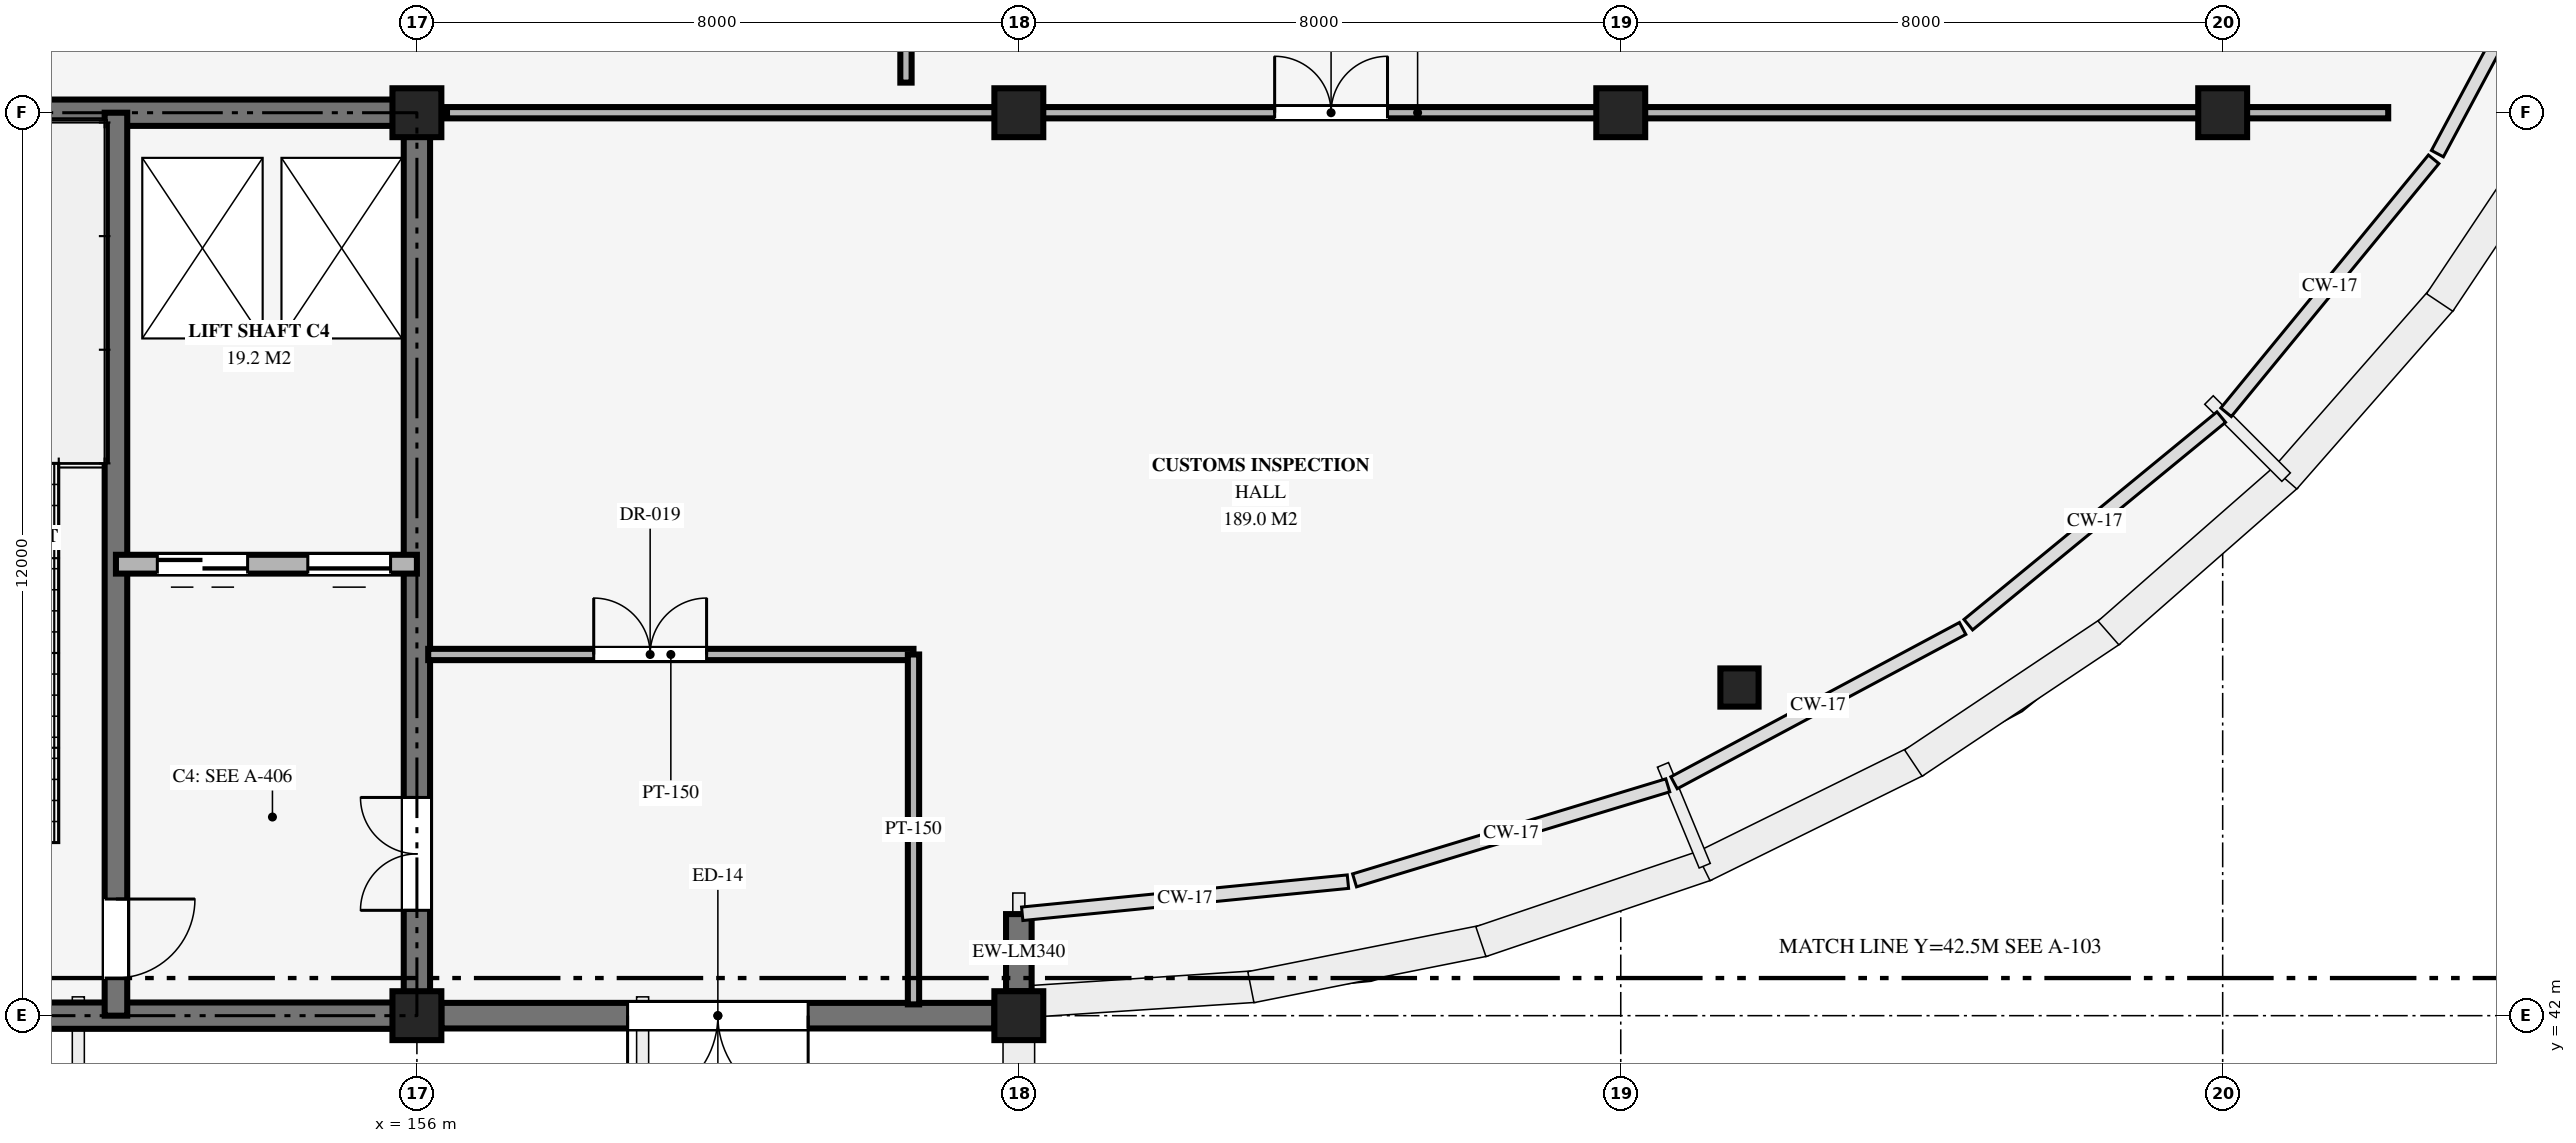
"""IFC4 building model, lengths in metres.
Left out: names, types, materials, properties, quantities, classifications, styles, units other than length and angle.
Written with IfcOpenShell. Run it as: python <this file> out.ifc"""

import sys

from ifc_helpers import new_model, si_unit, direction, frame, frame_2d, origin, origin_2d, place, context, subcontext, project, spatial, rectangle, hollow_circle, extrude, element, fill, save


model = new_model("IFC4")
c1 = context("Model", 3, precision=1e-05, world=origin(), true_north=direction((0.0, 1.0)))
c2 = subcontext(c1, "Body", "Model", "MODEL_VIEW")
j1 = project(units=[si_unit("LENGTHUNIT", "METRE"), si_unit("PLANEANGLEUNIT", "RADIAN")], contexts=[c1])
p1 = place(None, origin())
s1 = spatial("IfcSite", under=j1, at=p1, CompositionType="ELEMENT")
p2 = place(p1, origin())
s2 = spatial("IfcBuilding", under=s1, at=p2, CompositionType="ELEMENT")
p3 = place(p2, origin())
s3 = spatial("IfcBuildingStorey", under=s2, at=p3, CompositionType="ELEMENT", Elevation=0.0)
for number, where, z_axis, x_axis in (
    (1, (156.0, 42.0, 0.0), (0.0, 0.0, 1.0), (1.0, 0.0, 0.0)),
    (2, (156.0, 54.0, 0.0), (0.0, 0.0, 1.0), (1.0, 0.0, 0.0)),
    (3, (164.0, 42.0, 0.0), (0.0, 0.0, 1.0), (1.0, 0.0, 0.0)),
    (4, (164.0, 54.0, 0.0), (0.0, 0.0, 1.0), (1.0, 0.0, 0.0)),
    (5, (172.0, 54.0, 0.0), (0.0, 0.0, 1.0), (1.0, 0.0, 0.0)),
    (6, (180.0, 54.0, 0.0), (0.0, 0.0, 1.0), (1.0, 0.0, 0.0)),
):
    element("IfcColumn", number, at=place(p3, frame(where, z_axis=z_axis, x_axis=x_axis)), inside=s3, PredefinedType="COLUMN", context=c2, shape_type="SweptSolid", body=[
        extrude(rectangle(XDim=0.65, YDim=0.65, at=origin_2d()), origin(), (0.0, 0.0, 1.0), 5.24),
    ])
p4 = place(p3, frame((173.578, 46.361, 0.0), z_axis=(0.0, 0.0, 1.0), x_axis=(1.0, 0.0, 0.0)))
e7 = element("IfcColumn", 7, at=p4, inside=s3, PredefinedType="COLUMN", context=c2, shape_type="SweptSolid", body=[
    extrude(hollow_circle(Radius=0.254, WallThickness=0.02, at=origin_2d()), origin(), (0.0, 0.0, 1.0), 5.24),
])
p5 = place(p3, frame((164.0, 42.325, 0.0), z_axis=(0.0, 0.0, 1.0), x_axis=(0.0, 1.0, 0.0)))
e8 = element("IfcWall", 8, at=p5, inside=s3, PredefinedType="SOLIDWALL", context=c2, shape_type="SweptSolid", body=[
    extrude(rectangle(XDim=1.025, YDim=0.34, at=frame_2d((0.513, 0.0))), origin(), (0.0, 0.0, 1.0), 5.06),
])
p6 = place(p3, frame((163.675, 42.0, 0.0), z_axis=(0.0, 0.0, 1.0), x_axis=(-1.0, 0.0, 0.0)))
e9 = element("IfcWall", 9, at=p6, inside=s3, PredefinedType="SOLIDWALL", context=c2, shape_type="SweptSolid", body=[
    extrude(rectangle(XDim=7.35, YDim=0.34, at=frame_2d((3.675, 0.0))), origin(), (0.0, 0.0, 1.0), 5.06),
])
p7 = place(p6, frame((2.475, 0.0, 0.0)))
e10 = element("IfcOpeningElement", 10, at=p7, cuts=e9, PredefinedType="OPENING", context=c2, shape_type="SweptSolid", body=[
    extrude(rectangle(XDim=2.4, YDim=2.3, at=frame_2d((1.2, 1.15))), frame((0.0, 0.18, 0.0), z_axis=(0.0, -1.0, 0.0), x_axis=(1.0, 0.0, 0.0)), (0.0, 0.0, 1.0), 0.36),
])
for number, where, z_axis, x_axis in (
    (11, (148.0, 42.0, 0.0), (0.0, 0.0, 1.0), (1.0, 0.0, 0.0)),
    (12, (148.0, 54.0, 0.0), (0.0, 0.0, 1.0), (1.0, 0.0, 0.0)),
):
    element("IfcWall", number, at=place(p3, frame(where, z_axis=z_axis, x_axis=x_axis)), inside=s3, PredefinedType="SHEAR", context=c2, shape_type="SweptSolid", body=[
        extrude(rectangle(XDim=8.0, YDim=0.35, at=frame_2d((4.0, 0.0))), origin(), (0.0, 0.0, 1.0), 5.38),
    ])
p8 = place(p3, frame((156.0, 42.0, 0.0), z_axis=(0.0, 0.0, 1.0), x_axis=(0.0, 1.0, 0.0)))
e13 = element("IfcWall", 13, at=p8, inside=s3, PredefinedType="SHEAR", context=c2, shape_type="SweptSolid", body=[
    extrude(rectangle(XDim=12.0, YDim=0.35, at=frame_2d((6.0, 0.0))), origin(), (0.0, 0.0, 1.0), 5.38),
])
p9 = place(p8, frame((1.4, 0.0, 0.0)))
e14 = element("IfcOpeningElement", 14, at=p9, cuts=e13, PredefinedType="OPENING", context=c2, shape_type="SweptSolid", body=[
    extrude(rectangle(XDim=1.5, YDim=2.2, at=frame_2d((0.75, 1.1))), frame((0.0, 0.185, 0.0), z_axis=(0.0, -1.0, 0.0), x_axis=(1.0, 0.0, 0.0)), (0.0, 0.0, 1.0), 0.37),
])
p10 = place(p3, frame((152.0, 54.0, 0.0), z_axis=(0.0, 0.0, 1.0), x_axis=(0.0, -1.0, 0.0)))
e15 = element("IfcWall", 15, at=p10, inside=s3, PredefinedType="SHEAR", context=c2, shape_type="SweptSolid", body=[
    extrude(rectangle(XDim=12.0, YDim=0.3, at=frame_2d((6.0, 0.0))), origin(), (0.0, 0.0, 1.0), 5.38),
])
p11 = place(p10, frame((10.45, 0.0, 0.0)))
e16 = element("IfcOpeningElement", 16, at=p11, cuts=e15, PredefinedType="OPENING", context=c2, shape_type="SweptSolid", body=[
    extrude(rectangle(XDim=1.05, YDim=2.15, at=frame_2d((0.525, 1.075))), frame((0.0, 0.16, 0.0), z_axis=(0.0, -1.0, 0.0), x_axis=(1.0, 0.0, 0.0)), (0.0, 0.0, 1.0), 0.32),
])
p12 = place(p3, frame((156.0, 48.0, 0.0), z_axis=(0.0, 0.0, 1.0), x_axis=(-1.0, 0.0, 0.0)))
e17 = element("IfcWall", 17, at=p12, inside=s3, PredefinedType="SOLIDWALL", context=c2, shape_type="SweptSolid", body=[
    extrude(rectangle(XDim=4.0, YDim=0.25, at=frame_2d((2.0, 0.0))), origin(), (0.0, 0.0, 1.0), 4.2),
])
p13 = place(p12, frame((0.35, 0.0, 0.0)))
e18 = element("IfcOpeningElement", 18, at=p13, cuts=e17, PredefinedType="OPENING", context=c2, shape_type="SweptSolid", body=[
    extrude(rectangle(XDim=1.1, YDim=2.2, at=frame_2d((0.55, 1.1))), frame((0.0, 0.135, 0.0), z_axis=(0.0, -1.0, 0.0), x_axis=(1.0, 0.0, 0.0)), (0.0, 0.0, 1.0), 0.27),
])
p14 = place(p12, frame((2.25, 0.0, 0.0)))
e19 = element("IfcOpeningElement", 19, at=p14, cuts=e17, PredefinedType="OPENING", context=c2, shape_type="SweptSolid", body=[
    extrude(rectangle(XDim=1.2, YDim=2.2, at=frame_2d((0.6, 1.1))), frame((0.0, 0.135, 0.0), z_axis=(0.0, -1.0, 0.0), x_axis=(1.0, 0.0, 0.0)), (0.0, 0.0, 1.0), 0.27),
])
p15 = place(p3, frame((162.5, 54.4, 0.0), z_axis=(0.0, 0.0, 1.0), x_axis=(0.0, 1.0, 0.0)))
e20 = element("IfcWall", 20, at=p15, inside=s3, PredefinedType="PARTITIONING", context=c2, shape_type="SweptSolid", body=[
    extrude(rectangle(XDim=35.0, YDim=0.15, at=frame_2d((17.5, 0.0))), origin(), (0.0, 0.0, 1.0), 4.2),
])
p16 = place(p3, frame((156.4, 54.0, 0.0), z_axis=(0.0, 0.0, 1.0), x_axis=(1.0, 0.0, 0.0)))
e21 = element("IfcWall", 21, at=p16, inside=s3, PredefinedType="PARTITIONING", context=c2, shape_type="SweptSolid", body=[
    extrude(rectangle(XDim=25.8, YDim=0.15, at=frame_2d((12.9, 0.0))), origin(), (0.0, 0.0, 1.0), 4.2),
])
p17 = place(p16, frame((11.0, 0.0, 0.0)))
e22 = element("IfcOpeningElement", 22, at=p17, cuts=e21, PredefinedType="OPENING", context=c2, shape_type="SweptSolid", body=[
    extrude(rectangle(XDim=1.5, YDim=2.2, at=frame_2d((0.75, 1.1))), frame((0.0, 0.085, 0.0), z_axis=(0.0, -1.0, 0.0), x_axis=(1.0, 0.0, 0.0)), (0.0, 0.0, 1.0), 0.17),
])
p18 = place(p3, frame((156.15, 46.8, 0.0), z_axis=(0.0, 0.0, 1.0), x_axis=(1.0, 0.0, 0.0)))
e23 = element("IfcWall", 23, at=p18, inside=s3, PredefinedType="PARTITIONING", context=c2, shape_type="SweptSolid", body=[
    extrude(rectangle(XDim=6.45, YDim=0.15, at=frame_2d((3.225, 0.0))), origin(), (0.0, 0.0, 1.0), 4.2),
])
p19 = place(p18, frame((2.2, 0.0, 0.0)))
e24 = element("IfcOpeningElement", 24, at=p19, cuts=e23, PredefinedType="OPENING", context=c2, shape_type="SweptSolid", body=[
    extrude(rectangle(XDim=1.5, YDim=2.2, at=frame_2d((0.75, 1.1))), frame((0.0, 0.085, 0.0), z_axis=(0.0, -1.0, 0.0), x_axis=(1.0, 0.0, 0.0)), (0.0, 0.0, 1.0), 0.17),
])
p20 = place(p3, frame((162.6, 42.15, 0.0), z_axis=(0.0, 0.0, 1.0), x_axis=(0.0, 1.0, 0.0)))
e25 = element("IfcWall", 25, at=p20, inside=s3, PredefinedType="PARTITIONING", context=c2, shape_type="SweptSolid", body=[
    extrude(rectangle(XDim=4.65, YDim=0.15, at=frame_2d((2.325, 0.0))), origin(), (0.0, 0.0, 1.0), 4.2),
])
p21 = place(p7, origin())
e26 = element("IfcDoor", 26, at=p21, inside=s3, OperationType="DOUBLE_DOOR_SINGLE_SWING", PredefinedType="DOOR", context=c2, shape_type="SweptSolid", body=[
    extrude(rectangle(XDim=2.4, YDim=2.3, at=frame_2d((1.2, 1.15))), frame((0.0, 0.025, 0.0), z_axis=(0.0, -1.0, 0.0), x_axis=(1.0, 0.0, 0.0)), (0.0, 0.0, 1.0), 0.05),
])
fill(e10, e26)
p22 = place(p13, origin())
e27 = element("IfcDoor", 27, at=p22, inside=s3, OperationType="SLIDING_TO_LEFT", PredefinedType="USERDEFINED", context=c2, shape_type="SweptSolid", body=[
    extrude(rectangle(XDim=1.1, YDim=2.2, at=frame_2d((0.55, 1.1))), frame((0.0, 0.025, 0.0), z_axis=(0.0, -1.0, 0.0), x_axis=(1.0, 0.0, 0.0)), (0.0, 0.0, 1.0), 0.05),
])
fill(e18, e27)
p23 = place(p14, origin())
e28 = element("IfcDoor", 28, at=p23, inside=s3, OperationType="DOUBLE_DOOR_SLIDING", PredefinedType="USERDEFINED", context=c2, shape_type="SweptSolid", body=[
    extrude(rectangle(XDim=1.2, YDim=2.2, at=frame_2d((0.6, 1.1))), frame((0.0, 0.025, 0.0), z_axis=(0.0, -1.0, 0.0), x_axis=(1.0, 0.0, 0.0)), (0.0, 0.0, 1.0), 0.05),
])
fill(e19, e28)
p24 = place(p11, origin())
e29 = element("IfcDoor", 29, at=p24, inside=s3, OperationType="SINGLE_SWING_LEFT", PredefinedType="DOOR", context=c2, shape_type="SweptSolid", body=[
    extrude(rectangle(XDim=1.05, YDim=2.15, at=frame_2d((0.525, 1.075))), frame((0.0, 0.025, 0.0), z_axis=(0.0, -1.0, 0.0), x_axis=(1.0, 0.0, 0.0)), (0.0, 0.0, 1.0), 0.05),
])
fill(e16, e29)
p25 = place(p9, origin())
e30 = element("IfcDoor", 30, at=p25, inside=s3, OperationType="DOUBLE_DOOR_SINGLE_SWING", PredefinedType="DOOR", context=c2, shape_type="SweptSolid", body=[
    extrude(rectangle(XDim=1.5, YDim=2.2, at=frame_2d((0.75, 1.1))), frame((0.0, 0.025, 0.0), z_axis=(0.0, -1.0, 0.0), x_axis=(1.0, 0.0, 0.0)), (0.0, 0.0, 1.0), 0.05),
])
fill(e14, e30)
p26 = place(p17, origin())
e31 = element("IfcDoor", 31, at=p26, inside=s3, OperationType="DOUBLE_DOOR_SINGLE_SWING", PredefinedType="DOOR", context=c2, shape_type="SweptSolid", body=[
    extrude(rectangle(XDim=1.5, YDim=2.2, at=frame_2d((0.75, 1.1))), frame((0.0, 0.025, 0.0), z_axis=(0.0, -1.0, 0.0), x_axis=(1.0, 0.0, 0.0)), (0.0, 0.0, 1.0), 0.05),
])
fill(e22, e31)
p27 = place(p19, origin())
e32 = element("IfcDoor", 32, at=p27, inside=s3, OperationType="DOUBLE_DOOR_SINGLE_SWING", PredefinedType="DOOR", context=c2, shape_type="SweptSolid", body=[
    extrude(rectangle(XDim=1.5, YDim=2.2, at=frame_2d((0.75, 1.1))), frame((0.0, 0.025, 0.0), z_axis=(0.0, -1.0, 0.0), x_axis=(1.0, 0.0, 0.0)), (0.0, 0.0, 1.0), 0.05),
])
fill(e24, e32)
save(model, sys.argv[1])
